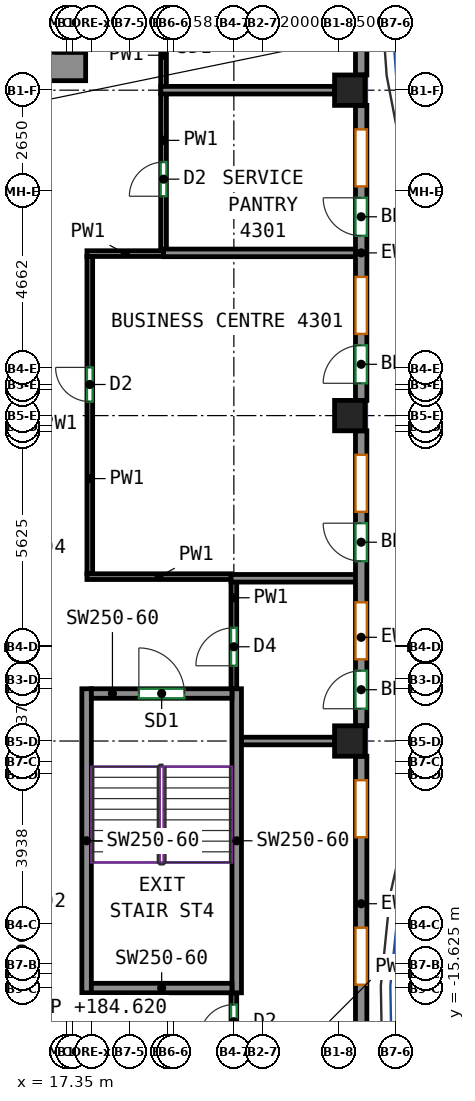
"""IFC4 building model, lengths in metres.
Left out: names, types, materials, properties, quantities, classifications, styles, units other than length and angle.
Written with IfcOpenShell. Run it as: python <this file> out.ifc"""

import sys

from ifc_helpers import new_model, si_unit, direction, frame, frame_2d, origin, origin_2d, place, context, subcontext, project, spatial, rectangle, extrude, source, transform, mapped, element, fill, save


model = new_model("IFC4")
c1 = context("Model", 3, precision=1e-05, world=origin(), true_north=direction((0.0, 1.0)))
c2 = subcontext(c1, "Body", "Model", "MODEL_VIEW")
j1 = project(units=[si_unit("LENGTHUNIT", "METRE"), si_unit("PLANEANGLEUNIT", "RADIAN")], contexts=[c1])
p1 = place(None, origin())
s1 = spatial("IfcSite", under=j1, at=p1, CompositionType="ELEMENT")
p2 = place(p1, origin())
s2 = spatial("IfcBuilding", under=s1, at=p2, CompositionType="ELEMENT")
p3 = place(p2, frame((0.0, 0.0, 182.1)))
s3 = spatial("IfcBuildingStorey", under=s2, at=p3, CompositionType="ELEMENT", Elevation=182.1)
m1 = source(origin(), c2, "Body", "SweptSolid", [
    extrude(rectangle(XDim=0.8, YDim=0.8, at=origin_2d()), origin(), (0.0, 0.0, 1.0), 3.12),
])
for number, where, z_axis, x_axis in (
    (1, (24.8, -9.125, 0.0), (0.0, 0.0, 1.0), (1.0, 0.0, 0.0)),
    (2, (24.8, -0.562, 0.0), (0.0, 0.0, 1.0), (1.0, 0.0, 0.0)),
    (3, (24.8, 8.0, 0.0), (0.0, 0.0, 1.0), (1.0, 0.0, 0.0)),
):
    element("IfcColumn", number, at=place(p3, frame(where, z_axis=z_axis, x_axis=x_axis)), inside=s3, PredefinedType="COLUMN", context=c2, shape_type="MappedRepresentation", body=[
        mapped(m1, transform((0.0, 0.0, 0.0))),
    ])
m2 = source(origin(), c2, "Body", "SweptSolid", [
    extrude(rectangle(XDim=5.38, YDim=0.75, at=frame_2d((2.69, 0.0))), origin(), (0.0, 0.0, 1.0), 3.12),
])
p4 = place(p3, frame((12.47, 8.625, 0.0), z_axis=(0.0, 0.0, 1.0), x_axis=(1.0, 0.0, 0.0)))
e4 = element("IfcWall", 4, at=p4, inside=s3, PredefinedType="SHEAR", context=c2, shape_type="MappedRepresentation", body=[
    mapped(m2, transform((0.0, 0.0, 0.0))),
])
p5 = place(p4, frame((2.18, 0.0, 0.0)))
e5 = element("IfcOpeningElement", 5, at=p5, cuts=e4, PredefinedType="OPENING", context=c2, shape_type="SweptSolid", body=[
    extrude(rectangle(XDim=1.2, YDim=2.1, at=frame_2d((0.6, 1.05))), frame((0.0, 0.385, 0.0), z_axis=(0.0, -1.0, 0.0), x_axis=(1.0, 0.0, 0.0)), (0.0, 0.0, 1.0), 0.77),
])
m3 = source(origin(), c2, "Body", "SweptSolid", [
    extrude(rectangle(XDim=8.0, YDim=0.25, at=frame_2d((4.0, 0.0))), origin(), (0.0, 0.0, 1.0), 3.12),
])
for number, where, z_axis, x_axis in (
    (6, (17.875, -15.75, 0.0), (0.0, 0.0, 1.0), (0.0, 1.0, 0.0)),
    (7, (21.825, -15.75, 0.0), (0.0, 0.0, 1.0), (0.0, 1.0, 0.0)),
):
    element("IfcWall", number, at=place(p3, frame(where, z_axis=z_axis, x_axis=x_axis)), inside=s3, PredefinedType="SHEAR", context=c2, shape_type="MappedRepresentation", body=[
        mapped(m3, transform((0.0, 0.0, 0.0))),
    ])
m4 = source(origin(), c2, "Body", "SweptSolid", [
    extrude(rectangle(XDim=3.7, YDim=0.25, at=frame_2d((1.85, 0.0))), origin(), (0.0, 0.0, 1.0), 3.12),
])
p6 = place(p3, frame((18.0, -15.625, 0.0), z_axis=(0.0, 0.0, 1.0), x_axis=(1.0, 0.0, 0.0)))
e8 = element("IfcWall", 8, at=p6, inside=s3, PredefinedType="SHEAR", context=c2, shape_type="MappedRepresentation", body=[
    mapped(m4, transform((0.0, 0.0, 0.0))),
])
p7 = place(p3, frame((18.0, -7.875, 0.0), z_axis=(0.0, 0.0, 1.0), x_axis=(1.0, 0.0, 0.0)))
e9 = element("IfcWall", 9, at=p7, inside=s3, PredefinedType="SHEAR", context=c2, shape_type="MappedRepresentation", body=[
    mapped(m4, transform((0.0, 0.0, 0.0))),
])
p8 = place(p7, frame((1.25, 0.0, 0.0)))
e10 = element("IfcOpeningElement", 10, at=p8, cuts=e9, PredefinedType="OPENING", context=c2, shape_type="SweptSolid", body=[
    extrude(rectangle(XDim=1.2, YDim=2.1, at=frame_2d((0.6, 1.05))), frame((0.0, 0.135, 0.0), z_axis=(0.0, -1.0, 0.0), x_axis=(1.0, 0.0, 0.0)), (0.0, 0.0, 1.0), 0.27),
])
m5 = source(origin(), c2, "Body", "SweptSolid", [
    extrude(rectangle(XDim=7.763, YDim=0.3, at=frame_2d((3.881, 0.0))), origin(), (0.0, 0.0, 1.0), 3.12),
])
p9 = place(p3, frame((25.1, -17.288, 0.0), z_axis=(0.0, 0.0, 1.0), x_axis=(0.0, 1.0, 0.0)))
e11 = element("IfcWall", 11, at=p9, inside=s3, PredefinedType="SOLIDWALL", context=c2, shape_type="MappedRepresentation", body=[
    mapped(m5, transform((0.0, 0.0, 0.0))),
])
p10 = place(p9, frame((1.75, 0.0, 0.85)))
e12 = element("IfcOpeningElement", 12, at=p10, cuts=e11, PredefinedType="OPENING", context=c2, shape_type="SweptSolid", body=[
    extrude(rectangle(XDim=1.5, YDim=1.95, at=frame_2d((0.75, 0.975))), frame((0.0, 0.16, 0.0), z_axis=(0.0, -1.0, 0.0), x_axis=(1.0, 0.0, 0.0)), (0.0, 0.0, 1.0), 0.32),
])
p11 = place(p9, frame((5.631, 0.0, 0.85)))
e13 = element("IfcOpeningElement", 13, at=p11, cuts=e11, PredefinedType="OPENING", context=c2, shape_type="SweptSolid", body=[
    extrude(rectangle(XDim=1.5, YDim=1.95, at=frame_2d((0.75, 0.975))), frame((0.0, 0.16, 0.0), z_axis=(0.0, -1.0, 0.0), x_axis=(1.0, 0.0, 0.0)), (0.0, 0.0, 1.0), 0.32),
])
p12 = place(p3, frame((25.1, -8.725, 0.0), z_axis=(0.0, 0.0, 1.0), x_axis=(0.0, 1.0, 0.0)))
e14 = element("IfcWall", 14, at=p12, inside=s3, PredefinedType="SOLIDWALL", context=c2, shape_type="MappedRepresentation", body=[
    mapped(m5, transform((0.0, 0.0, 0.0))),
])
p13 = place(p12, frame((1.75, 0.0, 0.85)))
e15 = element("IfcOpeningElement", 15, at=p13, cuts=e14, PredefinedType="OPENING", context=c2, shape_type="SweptSolid", body=[
    extrude(rectangle(XDim=1.5, YDim=1.95, at=frame_2d((0.75, 0.975))), frame((0.0, 0.16, 0.0), z_axis=(0.0, -1.0, 0.0), x_axis=(1.0, 0.0, 0.0)), (0.0, 0.0, 1.0), 0.32),
])
p14 = place(p12, frame((0.45, 0.0, 0.0)))
e16 = element("IfcOpeningElement", 16, at=p14, cuts=e14, PredefinedType="OPENING", context=c2, shape_type="SweptSolid", body=[
    extrude(rectangle(XDim=1.0, YDim=2.1, at=frame_2d((0.5, 1.05))), frame((0.0, 0.16, 0.0), z_axis=(0.0, -1.0, 0.0), x_axis=(1.0, 0.0, 0.0)), (0.0, 0.0, 1.0), 0.32),
])
p15 = place(p12, frame((5.631, 0.0, 0.85)))
e17 = element("IfcOpeningElement", 17, at=p15, cuts=e14, PredefinedType="OPENING", context=c2, shape_type="SweptSolid", body=[
    extrude(rectangle(XDim=1.5, YDim=1.95, at=frame_2d((0.75, 0.975))), frame((0.0, 0.16, 0.0), z_axis=(0.0, -1.0, 0.0), x_axis=(1.0, 0.0, 0.0)), (0.0, 0.0, 1.0), 0.32),
])
p16 = place(p12, frame((4.331, 0.0, 0.0)))
e18 = element("IfcOpeningElement", 18, at=p16, cuts=e14, PredefinedType="OPENING", context=c2, shape_type="SweptSolid", body=[
    extrude(rectangle(XDim=1.0, YDim=2.1, at=frame_2d((0.5, 1.05))), frame((0.0, 0.16, 0.0), z_axis=(0.0, -1.0, 0.0), x_axis=(1.0, 0.0, 0.0)), (0.0, 0.0, 1.0), 0.32),
])
p17 = place(p3, frame((25.1, -0.163, 0.0), z_axis=(0.0, 0.0, 1.0), x_axis=(0.0, 1.0, 0.0)))
e19 = element("IfcWall", 19, at=p17, inside=s3, PredefinedType="SOLIDWALL", context=c2, shape_type="MappedRepresentation", body=[
    mapped(m5, transform((0.0, 0.0, 0.0))),
])
p18 = place(p17, frame((1.75, 0.0, 0.85)))
e20 = element("IfcOpeningElement", 20, at=p18, cuts=e19, PredefinedType="OPENING", context=c2, shape_type="SweptSolid", body=[
    extrude(rectangle(XDim=1.5, YDim=1.95, at=frame_2d((0.75, 0.975))), frame((0.0, 0.16, 0.0), z_axis=(0.0, -1.0, 0.0), x_axis=(1.0, 0.0, 0.0)), (0.0, 0.0, 1.0), 0.32),
])
p19 = place(p17, frame((0.45, 0.0, 0.0)))
e21 = element("IfcOpeningElement", 21, at=p19, cuts=e19, PredefinedType="OPENING", context=c2, shape_type="SweptSolid", body=[
    extrude(rectangle(XDim=1.0, YDim=2.1, at=frame_2d((0.5, 1.05))), frame((0.0, 0.16, 0.0), z_axis=(0.0, -1.0, 0.0), x_axis=(1.0, 0.0, 0.0)), (0.0, 0.0, 1.0), 0.32),
])
p20 = place(p17, frame((5.631, 0.0, 0.85)))
e22 = element("IfcOpeningElement", 22, at=p20, cuts=e19, PredefinedType="OPENING", context=c2, shape_type="SweptSolid", body=[
    extrude(rectangle(XDim=1.5, YDim=1.95, at=frame_2d((0.75, 0.975))), frame((0.0, 0.16, 0.0), z_axis=(0.0, -1.0, 0.0), x_axis=(1.0, 0.0, 0.0)), (0.0, 0.0, 1.0), 0.32),
])
p21 = place(p17, frame((4.331, 0.0, 0.0)))
e23 = element("IfcOpeningElement", 23, at=p21, cuts=e19, PredefinedType="OPENING", context=c2, shape_type="SweptSolid", body=[
    extrude(rectangle(XDim=1.0, YDim=2.1, at=frame_2d((0.5, 1.05))), frame((0.0, 0.16, 0.0), z_axis=(0.0, -1.0, 0.0), x_axis=(1.0, 0.0, 0.0)), (0.0, 0.0, 1.0), 0.32),
])
m6 = source(origin(), c2, "Body", "SweptSolid", [
    extrude(rectangle(XDim=13.95, YDim=0.3, at=frame_2d((6.975, 0.0))), origin(), (0.0, 0.0, 1.0), 3.12),
])
p22 = place(p3, frame((25.1, 8.4, 0.0), z_axis=(0.0, 0.0, 1.0), x_axis=(0.0, 1.0, 0.0)))
e24 = element("IfcWall", 24, at=p22, inside=s3, PredefinedType="SOLIDWALL", context=c2, shape_type="MappedRepresentation", body=[
    mapped(m6, transform((0.0, 0.0, 0.0))),
])
p23 = place(p22, frame((0.994, 0.0, 0.85)))
e25 = element("IfcOpeningElement", 25, at=p23, cuts=e24, PredefinedType="OPENING", context=c2, shape_type="SweptSolid", body=[
    extrude(rectangle(XDim=1.5, YDim=1.95, at=frame_2d((0.75, 0.975))), frame((0.0, 0.16, 0.0), z_axis=(0.0, -1.0, 0.0), x_axis=(1.0, 0.0, 0.0)), (0.0, 0.0, 1.0), 0.32),
])
p24 = place(p22, frame((4.481, 0.0, 0.85)))
e26 = element("IfcOpeningElement", 26, at=p24, cuts=e24, PredefinedType="OPENING", context=c2, shape_type="SweptSolid", body=[
    extrude(rectangle(XDim=1.5, YDim=1.95, at=frame_2d((0.75, 0.975))), frame((0.0, 0.16, 0.0), z_axis=(0.0, -1.0, 0.0), x_axis=(1.0, 0.0, 0.0)), (0.0, 0.0, 1.0), 0.32),
])
p25 = place(p22, frame((7.969, 0.0, 0.85)))
e27 = element("IfcOpeningElement", 27, at=p25, cuts=e24, PredefinedType="OPENING", context=c2, shape_type="SweptSolid", body=[
    extrude(rectangle(XDim=1.5, YDim=1.95, at=frame_2d((0.75, 0.975))), frame((0.0, 0.16, 0.0), z_axis=(0.0, -1.0, 0.0), x_axis=(1.0, 0.0, 0.0)), (0.0, 0.0, 1.0), 0.32),
])
p26 = place(p22, frame((11.456, 0.0, 0.85)))
e28 = element("IfcOpeningElement", 28, at=p26, cuts=e24, PredefinedType="OPENING", context=c2, shape_type="SweptSolid", body=[
    extrude(rectangle(XDim=1.5, YDim=1.95, at=frame_2d((0.75, 0.975))), frame((0.0, 0.16, 0.0), z_axis=(0.0, -1.0, 0.0), x_axis=(1.0, 0.0, 0.0)), (0.0, 0.0, 1.0), 0.32),
])
p27 = place(p3, frame((19.9, 3.809, 0.0), z_axis=(0.0, 0.0, 1.0), x_axis=(0.0, 1.0, 0.0)))
e29 = element("IfcWall", 29, at=p27, inside=s3, PredefinedType="PARTITIONING", context=c2, shape_type="SweptSolid", body=[
    extrude(rectangle(XDim=4.101, YDim=0.15, at=frame_2d((2.05, 0.0))), origin(), (0.0, 0.0, 1.0), 3.12),
])
p28 = place(p27, frame((1.4, 0.0, 0.0)))
e30 = element("IfcOpeningElement", 30, at=p28, cuts=e29, PredefinedType="OPENING", context=c2, shape_type="SweptSolid", body=[
    extrude(rectangle(XDim=0.9, YDim=2.1, at=frame_2d((0.45, 1.05))), frame((0.0, 0.085, 0.0), z_axis=(0.0, -1.0, 0.0), x_axis=(1.0, 0.0, 0.0)), (0.0, 0.0, 1.0), 0.17),
])
p29 = place(p3, frame((19.9, 8.09, 0.0), z_axis=(0.0, 0.0, 1.0), x_axis=(0.0, 1.0, 0.0)))
e31 = element("IfcWall", 31, at=p29, inside=s3, PredefinedType="PARTITIONING", context=c2, shape_type="SweptSolid", body=[
    extrude(rectangle(XDim=1.66, YDim=0.15, at=frame_2d((0.83, 0.0))), origin(), (0.0, 0.0, 1.0), 3.12),
])
p30 = place(p3, frame((17.884, 3.7, 0.0), z_axis=(0.0, 0.0, 1.0), x_axis=(1.0, 0.0, 0.0)))
e32 = element("IfcWall", 32, at=p30, inside=s3, PredefinedType="PARTITIONING", context=c2, shape_type="SweptSolid", body=[
    extrude(rectangle(XDim=2.016, YDim=0.15, at=frame_2d((1.008, 0.0))), origin(), (0.0, 0.0, 1.0), 3.12),
])
p31 = place(p3, frame((17.959, -4.725, 0.0), z_axis=(0.0, 0.0, 1.0), x_axis=(0.0, 1.0, 0.0)))
e33 = element("IfcWall", 33, at=p31, inside=s3, PredefinedType="PARTITIONING", context=c2, shape_type="SweptSolid", body=[
    extrude(rectangle(XDim=8.35, YDim=0.15, at=frame_2d((4.175, 0.0))), origin(), (0.0, 0.0, 1.0), 3.12),
])
p32 = place(p31, frame((4.531, 0.0, 0.0)))
e34 = element("IfcOpeningElement", 34, at=p32, cuts=e33, PredefinedType="OPENING", context=c2, shape_type="SweptSolid", body=[
    extrude(rectangle(XDim=0.9, YDim=2.1, at=frame_2d((0.45, 1.05))), frame((0.0, 0.085, 0.0), z_axis=(0.0, -1.0, 0.0), x_axis=(1.0, 0.0, 0.0)), (0.0, 0.0, 1.0), 0.17),
])
p33 = place(p3, frame((17.884, -4.8, 0.0), z_axis=(0.0, 0.0, 1.0), x_axis=(1.0, 0.0, 0.0)))
e35 = element("IfcWall", 35, at=p33, inside=s3, PredefinedType="PARTITIONING", context=c2, shape_type="SweptSolid", body=[
    extrude(rectangle(XDim=3.793, YDim=0.15, at=frame_2d((1.896, 0.0))), origin(), (0.0, 0.0, 1.0), 3.12),
])
p34 = place(p3, frame((21.75, -7.75, 0.0), z_axis=(0.0, 0.0, 1.0), x_axis=(0.0, 1.0, 0.0)))
e36 = element("IfcWall", 36, at=p34, inside=s3, PredefinedType="PARTITIONING", context=c2, shape_type="SweptSolid", body=[
    extrude(rectangle(XDim=2.817, YDim=0.15, at=frame_2d((1.408, 0.0))), origin(), (0.0, 0.0, 1.0), 3.12),
])
p35 = place(p34, frame((0.605, 0.0, 0.0)))
e37 = element("IfcOpeningElement", 37, at=p35, cuts=e36, PredefinedType="OPENING", context=c2, shape_type="SweptSolid", body=[
    extrude(rectangle(XDim=1.0, YDim=2.1, at=frame_2d((0.5, 1.05))), frame((0.0, 0.085, 0.0), z_axis=(0.0, -1.0, 0.0), x_axis=(1.0, 0.0, 0.0)), (0.0, 0.0, 1.0), 0.17),
])
p36 = place(p3, frame((21.75, -17.598, 0.0), z_axis=(0.0, 0.0, 1.0), x_axis=(0.0, 1.0, 0.0)))
e38 = element("IfcWall", 38, at=p36, inside=s3, PredefinedType="PARTITIONING", context=c2, shape_type="SweptSolid", body=[
    extrude(rectangle(XDim=1.848, YDim=0.15, at=frame_2d((0.924, 0.0))), origin(), (0.0, 0.0, 1.0), 3.12),
])
p37 = place(p36, frame((0.638, 0.0, 0.0)))
e39 = element("IfcOpeningElement", 39, at=p37, cuts=e38, PredefinedType="OPENING", context=c2, shape_type="SweptSolid", body=[
    extrude(rectangle(XDim=0.9, YDim=2.1, at=frame_2d((0.45, 1.05))), frame((0.0, 0.085, 0.0), z_axis=(0.0, -1.0, 0.0), x_axis=(1.0, 0.0, 0.0)), (0.0, 0.0, 1.0), 0.17),
])
p38 = place(p3, frame((19.827, 8.0, 0.0), z_axis=(0.0, 0.0, 1.0), x_axis=(1.0, 0.0, 0.0)))
e40 = element("IfcWall", 40, at=p38, inside=s3, PredefinedType="PARTITIONING", context=c2, shape_type="SweptSolid", body=[
    extrude(rectangle(XDim=4.573, YDim=0.2, at=frame_2d((2.287, 0.0))), origin(), (0.0, 0.0, 1.0), 3.12),
])
p39 = place(p3, frame((19.902, 3.719, 0.0), z_axis=(0.0, 0.0, 1.0), x_axis=(1.0, 0.0, 0.0)))
e41 = element("IfcWall", 41, at=p39, inside=s3, PredefinedType="PARTITIONING", context=c2, shape_type="SweptSolid", body=[
    extrude(rectangle(XDim=5.098, YDim=0.2, at=frame_2d((2.549, 0.0))), origin(), (0.0, 0.0, 1.0), 3.12),
])
p40 = place(p3, frame((21.677, -4.843, 0.0), z_axis=(0.0, 0.0, 1.0), x_axis=(1.0, 0.0, 0.0)))
e42 = element("IfcWall", 42, at=p40, inside=s3, PredefinedType="PARTITIONING", context=c2, shape_type="SweptSolid", body=[
    extrude(rectangle(XDim=3.323, YDim=0.2, at=frame_2d((1.662, 0.0))), origin(), (0.0, 0.0, 1.0), 3.12),
])
p41 = place(p3, frame((21.95, -9.125, 0.0), z_axis=(0.0, 0.0, 1.0), x_axis=(1.0, 0.0, 0.0)))
e43 = element("IfcWall", 43, at=p41, inside=s3, PredefinedType="PARTITIONING", context=c2, shape_type="SweptSolid", body=[
    extrude(rectangle(XDim=2.45, YDim=0.2, at=frame_2d((1.225, 0.0))), origin(), (0.0, 0.0, 1.0), 3.12),
])
p42 = place(p10, origin())
e44 = element("IfcWindow", 44, at=p42, inside=s3, PartitioningType="SINGLE_PANEL", PredefinedType="WINDOW", context=c2, shape_type="SweptSolid", body=[
    extrude(rectangle(XDim=1.5, YDim=1.95, at=frame_2d((0.75, 0.975))), frame((0.0, 0.03, 0.0), z_axis=(0.0, -1.0, 0.0), x_axis=(1.0, 0.0, 0.0)), (0.0, 0.0, 1.0), 0.06),
])
fill(e12, e44)
p43 = place(p11, origin())
e45 = element("IfcWindow", 45, at=p43, inside=s3, PartitioningType="SINGLE_PANEL", PredefinedType="WINDOW", context=c2, shape_type="SweptSolid", body=[
    extrude(rectangle(XDim=1.5, YDim=1.95, at=frame_2d((0.75, 0.975))), frame((0.0, 0.03, 0.0), z_axis=(0.0, -1.0, 0.0), x_axis=(1.0, 0.0, 0.0)), (0.0, 0.0, 1.0), 0.06),
])
fill(e13, e45)
p44 = place(p13, origin())
e46 = element("IfcWindow", 46, at=p44, inside=s3, PartitioningType="SINGLE_PANEL", PredefinedType="WINDOW", context=c2, shape_type="SweptSolid", body=[
    extrude(rectangle(XDim=1.5, YDim=1.95, at=frame_2d((0.75, 0.975))), frame((0.0, 0.03, 0.0), z_axis=(0.0, -1.0, 0.0), x_axis=(1.0, 0.0, 0.0)), (0.0, 0.0, 1.0), 0.06),
])
fill(e15, e46)
p45 = place(p14, origin())
e47 = element("IfcDoor", 47, at=p45, inside=s3, OperationType="SINGLE_SWING_LEFT", PredefinedType="DOOR", context=c2, shape_type="SweptSolid", body=[
    extrude(rectangle(XDim=1.0, YDim=2.1, at=frame_2d((0.5, 1.05))), frame((0.0, 0.025, 0.0), z_axis=(0.0, -1.0, 0.0), x_axis=(1.0, 0.0, 0.0)), (0.0, 0.0, 1.0), 0.05),
])
fill(e16, e47)
p46 = place(p15, origin())
e48 = element("IfcWindow", 48, at=p46, inside=s3, PartitioningType="SINGLE_PANEL", PredefinedType="WINDOW", context=c2, shape_type="SweptSolid", body=[
    extrude(rectangle(XDim=1.5, YDim=1.95, at=frame_2d((0.75, 0.975))), frame((0.0, 0.03, 0.0), z_axis=(0.0, -1.0, 0.0), x_axis=(1.0, 0.0, 0.0)), (0.0, 0.0, 1.0), 0.06),
])
fill(e17, e48)
p47 = place(p16, origin())
e49 = element("IfcDoor", 49, at=p47, inside=s3, OperationType="SINGLE_SWING_RIGHT", PredefinedType="DOOR", context=c2, shape_type="SweptSolid", body=[
    extrude(rectangle(XDim=1.0, YDim=2.1, at=frame_2d((0.5, 1.05))), frame((0.0, 0.025, 0.0), z_axis=(0.0, -1.0, 0.0), x_axis=(1.0, 0.0, 0.0)), (0.0, 0.0, 1.0), 0.05),
])
fill(e18, e49)
p48 = place(p18, origin())
e50 = element("IfcWindow", 50, at=p48, inside=s3, PartitioningType="SINGLE_PANEL", PredefinedType="WINDOW", context=c2, shape_type="SweptSolid", body=[
    extrude(rectangle(XDim=1.5, YDim=1.95, at=frame_2d((0.75, 0.975))), frame((0.0, 0.03, 0.0), z_axis=(0.0, -1.0, 0.0), x_axis=(1.0, 0.0, 0.0)), (0.0, 0.0, 1.0), 0.06),
])
fill(e20, e50)
p49 = place(p19, origin())
e51 = element("IfcDoor", 51, at=p49, inside=s3, OperationType="SINGLE_SWING_LEFT", PredefinedType="DOOR", context=c2, shape_type="SweptSolid", body=[
    extrude(rectangle(XDim=1.0, YDim=2.1, at=frame_2d((0.5, 1.05))), frame((0.0, 0.025, 0.0), z_axis=(0.0, -1.0, 0.0), x_axis=(1.0, 0.0, 0.0)), (0.0, 0.0, 1.0), 0.05),
])
fill(e21, e51)
p50 = place(p20, origin())
e52 = element("IfcWindow", 52, at=p50, inside=s3, PartitioningType="SINGLE_PANEL", PredefinedType="WINDOW", context=c2, shape_type="SweptSolid", body=[
    extrude(rectangle(XDim=1.5, YDim=1.95, at=frame_2d((0.75, 0.975))), frame((0.0, 0.03, 0.0), z_axis=(0.0, -1.0, 0.0), x_axis=(1.0, 0.0, 0.0)), (0.0, 0.0, 1.0), 0.06),
])
fill(e22, e52)
p51 = place(p21, origin())
e53 = element("IfcDoor", 53, at=p51, inside=s3, OperationType="SINGLE_SWING_RIGHT", PredefinedType="DOOR", context=c2, shape_type="SweptSolid", body=[
    extrude(rectangle(XDim=1.0, YDim=2.1, at=frame_2d((0.5, 1.05))), frame((0.0, 0.025, 0.0), z_axis=(0.0, -1.0, 0.0), x_axis=(1.0, 0.0, 0.0)), (0.0, 0.0, 1.0), 0.05),
])
fill(e23, e53)
p52 = place(p8, origin())
e54 = element("IfcDoor", 54, at=p52, inside=s3, OperationType="DOUBLE_DOOR_SINGLE_SWING", PredefinedType="DOOR", context=c2, shape_type="SweptSolid", body=[
    extrude(rectangle(XDim=1.2, YDim=2.1, at=frame_2d((0.6, 1.05))), frame((0.0, 0.025, 0.0), z_axis=(0.0, -1.0, 0.0), x_axis=(1.0, 0.0, 0.0)), (0.0, 0.0, 1.0), 0.05),
])
fill(e10, e54)
p53 = place(p37, origin())
e55 = element("IfcDoor", 55, at=p53, inside=s3, OperationType="SINGLE_SWING_LEFT", PredefinedType="DOOR", context=c2, shape_type="SweptSolid", body=[
    extrude(rectangle(XDim=0.9, YDim=2.1, at=frame_2d((0.45, 1.05))), frame((0.0, 0.025, 0.0), z_axis=(0.0, -1.0, 0.0), x_axis=(1.0, 0.0, 0.0)), (0.0, 0.0, 1.0), 0.05),
])
fill(e39, e55)
p54 = place(p35, origin())
e56 = element("IfcDoor", 56, at=p54, inside=s3, OperationType="SINGLE_SWING_LEFT", PredefinedType="DOOR", context=c2, shape_type="SweptSolid", body=[
    extrude(rectangle(XDim=1.0, YDim=2.1, at=frame_2d((0.5, 1.05))), frame((0.0, 0.025, 0.0), z_axis=(0.0, -1.0, 0.0), x_axis=(1.0, 0.0, 0.0)), (0.0, 0.0, 1.0), 0.05),
])
fill(e37, e56)
p55 = place(p32, origin())
e57 = element("IfcDoor", 57, at=p55, inside=s3, OperationType="SINGLE_SWING_RIGHT", PredefinedType="DOOR", context=c2, shape_type="SweptSolid", body=[
    extrude(rectangle(XDim=0.9, YDim=2.1, at=frame_2d((0.45, 1.05))), frame((0.0, 0.025, 0.0), z_axis=(0.0, -1.0, 0.0), x_axis=(1.0, 0.0, 0.0)), (0.0, 0.0, 1.0), 0.05),
])
fill(e34, e57)
p56 = place(p28, origin())
e58 = element("IfcDoor", 58, at=p56, inside=s3, OperationType="SINGLE_SWING_LEFT", PredefinedType="DOOR", context=c2, shape_type="SweptSolid", body=[
    extrude(rectangle(XDim=0.9, YDim=2.1, at=frame_2d((0.45, 1.05))), frame((0.0, 0.025, 0.0), z_axis=(0.0, -1.0, 0.0), x_axis=(1.0, 0.0, 0.0)), (0.0, 0.0, 1.0), 0.05),
])
fill(e30, e58)
save(model, sys.argv[1])
